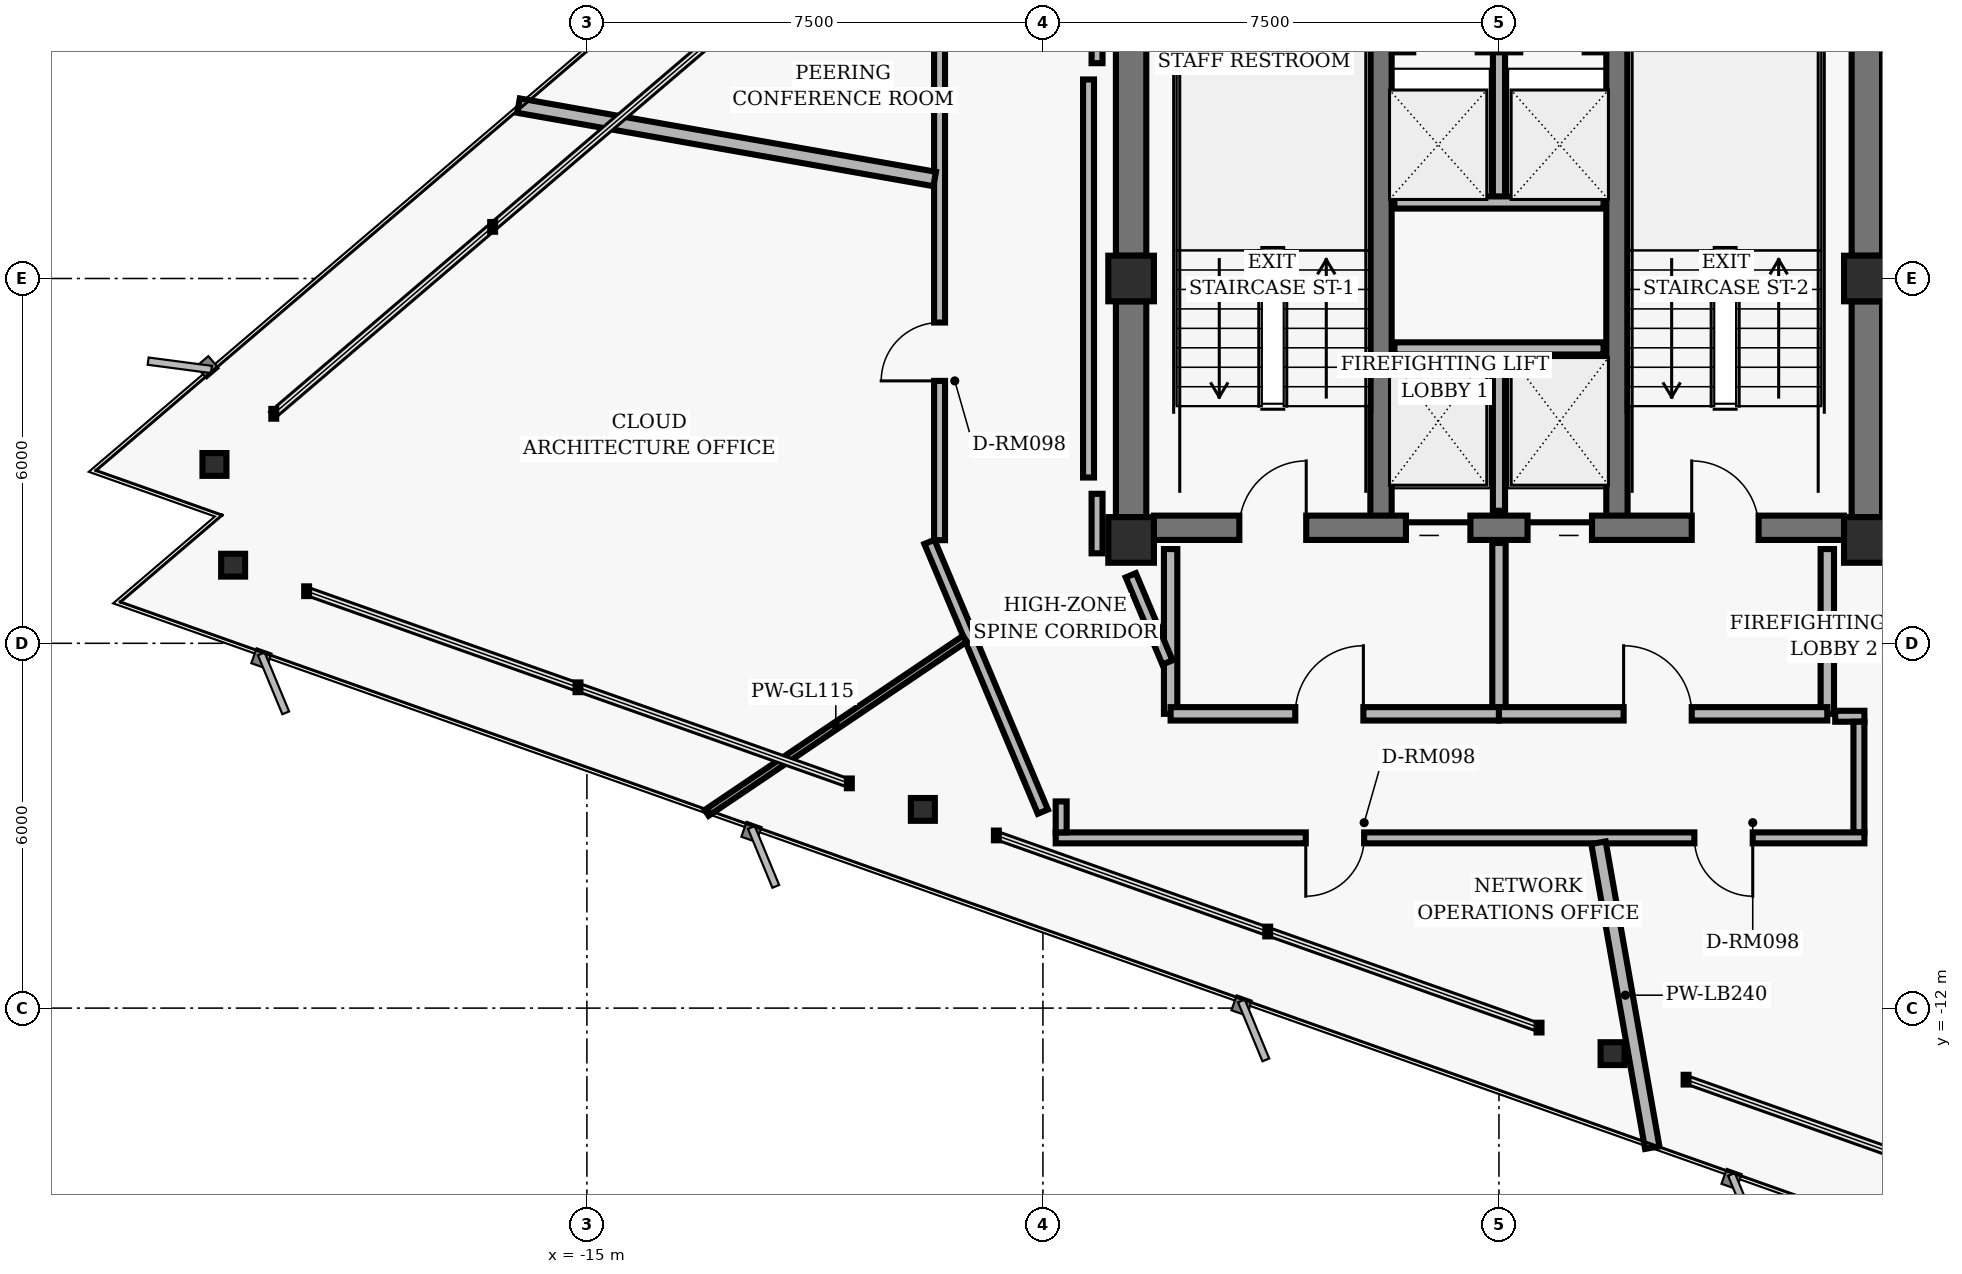
"""IFC4 building model, lengths in metres.
Left out: names, types, materials, properties, quantities, classifications, styles, units other than length and angle.
Written with IfcOpenShell. Run it as: python <this file> out.ifc"""

import sys

from ifc_helpers import new_model, si_unit, direction, frame, frame_2d, origin, origin_2d, place, context, subcontext, project, spatial, rectangle, hollow_rectangle, i_section, extrude, element, fill, save


model = new_model("IFC4")
c1 = context("Model", 3, precision=1e-05, world=origin(), true_north=direction((0.0, 1.0)))
c2 = subcontext(c1, "Body", "Model", "MODEL_VIEW")
j1 = project(units=[si_unit("LENGTHUNIT", "METRE"), si_unit("PLANEANGLEUNIT", "RADIAN")], contexts=[c1])
p1 = place(None, origin())
s1 = spatial("IfcSite", under=j1, at=p1, CompositionType="ELEMENT")
p2 = place(p1, origin())
s2 = spatial("IfcBuilding", under=s1, at=p2, CompositionType="ELEMENT")
p3 = place(p2, frame((0.0, 0.0, 187.52)))
s3 = spatial("IfcBuildingStorey", under=s2, at=p3, CompositionType="ELEMENT", Elevation=187.52)
for number, where, z_axis, x_axis in (
    (1, (-6.05, 0.0, 0.0), (0.0, 0.0, 1.0), (1.0, 0.0, 0.0)),
    (2, (6.05, 0.0, 0.0), (0.0, 0.0, 1.0), (1.0, 0.0, 0.0)),
    (3, (-6.05, -4.3, 0.0), (0.0, 0.0, 1.0), (1.0, 0.0, 0.0)),
    (4, (6.05, -4.3, 0.0), (0.0, 0.0, 1.0), (1.0, 0.0, 0.0)),
):
    element("IfcColumn", number, at=place(p3, frame(where, z_axis=z_axis, x_axis=x_axis)), inside=s3, PredefinedType="COLUMN", context=c2, shape_type="SweptSolid", body=[
        extrude(hollow_rectangle(XDim=0.75, YDim=0.75, WallThickness=0.05, InnerFilletRadius=0.02, OuterFilletRadius=0.04, at=origin_2d()), origin(), (0.0, 0.0, 1.0), 3.04),
    ])
p4 = place(p3, frame((-6.05, 0.375, 0.0), z_axis=(0.0, 0.0, 1.0), x_axis=(0.0, 1.0, 0.0)))
e5 = element("IfcWall", 5, at=p4, inside=s3, PredefinedType="SHEAR", context=c2, shape_type="SweptSolid", body=[
    extrude(rectangle(XDim=3.75, YDim=0.5, at=frame_2d((1.875, 0.0))), origin(), (0.0, 0.0, 1.0), 2.798),
])
p5 = place(p3, frame((-6.05, -3.925, 0.0), z_axis=(0.0, 0.0, 1.0), x_axis=(0.0, 1.0, 0.0)))
e6 = element("IfcWall", 6, at=p5, inside=s3, PredefinedType="SHEAR", context=c2, shape_type="SweptSolid", body=[
    extrude(rectangle(XDim=3.55, YDim=0.5, at=frame_2d((1.775, 0.0))), origin(), (0.0, 0.0, 1.0), 2.798),
])
p6 = place(p3, frame((6.05, 0.375, 0.0), z_axis=(0.0, 0.0, 1.0), x_axis=(0.0, 1.0, 0.0)))
e7 = element("IfcWall", 7, at=p6, inside=s3, PredefinedType="SHEAR", context=c2, shape_type="SweptSolid", body=[
    extrude(rectangle(XDim=3.75, YDim=0.5, at=frame_2d((1.875, 0.0))), origin(), (0.0, 0.0, 1.0), 2.798),
])
p7 = place(p3, frame((6.05, -3.925, 0.0), z_axis=(0.0, 0.0, 1.0), x_axis=(0.0, 1.0, 0.0)))
e8 = element("IfcWall", 8, at=p7, inside=s3, PredefinedType="SHEAR", context=c2, shape_type="SweptSolid", body=[
    extrude(rectangle(XDim=3.55, YDim=0.5, at=frame_2d((1.775, 0.0))), origin(), (0.0, 0.0, 1.0), 2.798),
])
for number, where, z_axis, x_axis in (
    (9, (-1.94, -4.1, 0.0), (0.0, 0.0, 1.0), (0.0, 1.0, 0.0)),
    (10, (1.94, -4.1, 0.0), (0.0, 0.0, 1.0), (0.0, 1.0, 0.0)),
):
    element("IfcWall", number, at=place(p3, frame(where, z_axis=z_axis, x_axis=x_axis)), inside=s3, PredefinedType="SHEAR", context=c2, shape_type="SweptSolid", body=[
        extrude(rectangle(XDim=8.2, YDim=0.35, at=frame_2d((4.1, 0.0))), origin(), (0.0, 0.0, 1.0), 2.798),
    ])
p8 = place(p3, frame((-5.675, -4.1, 0.0), z_axis=(0.0, 0.0, 1.0), x_axis=(1.0, 0.0, 0.0)))
e11 = element("IfcWall", 11, at=p8, inside=s3, PredefinedType="SHEAR", context=c2, shape_type="SweptSolid", body=[
    extrude(rectangle(XDim=11.35, YDim=0.4, at=frame_2d((5.675, 0.0))), origin(), (0.0, 0.0, 1.0), 2.798),
])
p9 = place(p8, frame((1.405, 0.0, 0.0)))
e12 = element("IfcOpeningElement", 12, at=p9, cuts=e11, PredefinedType="OPENING", context=c2, shape_type="SweptSolid", body=[
    extrude(rectangle(XDim=1.1, YDim=2.04, at=frame_2d((0.55, 1.02))), frame((0.0, 0.21, 0.0), z_axis=(0.0, -1.0, 0.0), x_axis=(1.0, 0.0, 0.0)), (0.0, 0.0, 1.0), 0.42),
])
p10 = place(p8, frame((8.845, 0.0, 0.0)))
e13 = element("IfcOpeningElement", 13, at=p10, cuts=e11, PredefinedType="OPENING", context=c2, shape_type="SweptSolid", body=[
    extrude(rectangle(XDim=1.1, YDim=2.04, at=frame_2d((0.55, 1.02))), frame((0.0, 0.21, 0.0), z_axis=(0.0, -1.0, 0.0), x_axis=(1.0, 0.0, 0.0)), (0.0, 0.0, 1.0), 0.42),
])
p11 = place(p8, frame((4.145, 0.0, 0.0)))
e14 = element("IfcOpeningElement", 14, at=p11, cuts=e11, PredefinedType="OPENING", context=c2, shape_type="SweptSolid", body=[
    extrude(rectangle(XDim=1.06, YDim=2.04, at=frame_2d((0.53, 1.02))), frame((0.0, 0.21, 0.0), z_axis=(0.0, -1.0, 0.0), x_axis=(1.0, 0.0, 0.0)), (0.0, 0.0, 1.0), 0.42),
])
p12 = place(p8, frame((6.145, 0.0, 0.0)))
e15 = element("IfcOpeningElement", 15, at=p12, cuts=e11, PredefinedType="OPENING", context=c2, shape_type="SweptSolid", body=[
    extrude(rectangle(XDim=1.06, YDim=2.04, at=frame_2d((0.53, 1.02))), frame((0.0, 0.21, 0.0), z_axis=(0.0, -1.0, 0.0), x_axis=(1.0, 0.0, 0.0)), (0.0, 0.0, 1.0), 0.42),
])
for number, where, z_axis, x_axis in (
    (16, (-21.125, -3.059, 0.0), (0.0, 0.0, 1.0), (1.0, 0.0, 0.0)),
    (17, (-20.818, -4.715, 0.0), (0.0, 0.0, 1.0), (1.0, 0.0, 0.0)),
    (18, (-9.475, -8.732, 0.0), (0.0, 0.0, 1.0), (1.0, 0.0, 0.0)),
    (19, (1.868, -12.749, 0.0), (0.0, 0.0, 1.0), (1.0, 0.0, 0.0)),
):
    element("IfcColumn", number, at=place(p3, frame(where, z_axis=z_axis, x_axis=x_axis)), inside=s3, PredefinedType="COLUMN", context=c2, shape_type="SweptSolid", body=[
        extrude(i_section(OverallWidth=0.394, OverallDepth=0.375, WebThickness=0.017, FlangeThickness=0.028, FilletRadius=0.016, at=origin_2d()), origin(), (0.0, 0.0, 1.0), 3.04),
    ])
p13 = place(p3, frame((0.0, -3.82, 0.0), z_axis=(0.0, 0.0, 1.0), x_axis=(0.0, 1.0, 0.0)))
e20 = element("IfcWall", 20, at=p13, inside=s3, PredefinedType="PARTITIONING", context=c2, shape_type="SweptSolid", body=[
    extrude(rectangle(XDim=2.67, YDim=0.2, at=frame_2d((1.335, 0.0))), origin(), (0.0, 0.0, 1.0), 2.773),
])
p14 = place(p3, frame((-1.72, -1.15, 0.0), z_axis=(0.0, 0.0, 1.0), x_axis=(1.0, 0.0, 0.0)))
e21 = element("IfcWall", 21, at=p14, inside=s3, PredefinedType="PARTITIONING", context=c2, shape_type="SweptSolid", body=[
    extrude(rectangle(XDim=3.44, YDim=0.2, at=frame_2d((1.72, 0.0))), origin(), (0.0, 0.0, 1.0), 2.773),
])
for number, where, z_axis, x_axis in (
    (22, (-5.4, -7.16, 0.0), (0.0, 0.0, 1.0), (0.0, 1.0, 0.0)),
    (23, (5.4, -7.16, 0.0), (0.0, 0.0, 1.0), (0.0, 1.0, 0.0)),
):
    element("IfcWall", number, at=place(p3, frame(where, z_axis=z_axis, x_axis=x_axis)), inside=s3, PredefinedType="PARTITIONING", context=c2, shape_type="SweptSolid", body=[
        extrude(rectangle(XDim=2.71, YDim=0.22, at=frame_2d((1.355, 0.0))), origin(), (0.0, 0.0, 1.0), 2.773),
    ])
p15 = place(p3, frame((0.0, -7.16, 0.0), z_axis=(0.0, 0.0, 1.0), x_axis=(0.0, 1.0, 0.0)))
e24 = element("IfcWall", 24, at=p15, inside=s3, PredefinedType="PARTITIONING", context=c2, shape_type="SweptSolid", body=[
    extrude(rectangle(XDim=2.81, YDim=0.22, at=frame_2d((1.405, 0.0))), origin(), (0.0, 0.0, 1.0), 2.773),
])
p16 = place(p3, frame((-5.4, -7.16, 0.0), z_axis=(0.0, 0.0, 1.0), x_axis=(1.0, 0.0, 0.0)))
e25 = element("IfcWall", 25, at=p16, inside=s3, PredefinedType="PARTITIONING", context=c2, shape_type="SweptSolid", body=[
    extrude(rectangle(XDim=5.4, YDim=0.22, at=frame_2d((2.7, 0.0))), origin(), (0.0, 0.0, 1.0), 2.395),
])
p17 = place(p16, frame((2.05, 0.0, 0.0)))
e26 = element("IfcOpeningElement", 26, at=p17, cuts=e25, PredefinedType="OPENING", context=c2, shape_type="SweptSolid", body=[
    extrude(rectangle(XDim=1.12, YDim=2.02, at=frame_2d((0.56, 1.01))), frame((0.0, 0.12, 0.0), z_axis=(0.0, -1.0, 0.0), x_axis=(1.0, 0.0, 0.0)), (0.0, 0.0, 1.0), 0.24),
])
p18 = place(p3, frame((0.0, -7.16, 0.0), z_axis=(0.0, 0.0, 1.0), x_axis=(1.0, 0.0, 0.0)))
e27 = element("IfcWall", 27, at=p18, inside=s3, PredefinedType="PARTITIONING", context=c2, shape_type="SweptSolid", body=[
    extrude(rectangle(XDim=5.4, YDim=0.22, at=frame_2d((2.7, 0.0))), origin(), (0.0, 0.0, 1.0), 2.395),
])
p19 = place(p18, frame((2.05, 0.0, 0.0)))
e28 = element("IfcOpeningElement", 28, at=p19, cuts=e27, PredefinedType="OPENING", context=c2, shape_type="SweptSolid", body=[
    extrude(rectangle(XDim=1.12, YDim=2.02, at=frame_2d((0.56, 1.01))), frame((0.0, 0.12, 0.0), z_axis=(0.0, -1.0, 0.0), x_axis=(1.0, 0.0, 0.0)), (0.0, 0.0, 1.0), 0.24),
])
p20 = place(p3, frame((0.0, 1.25, 0.0), z_axis=(0.0, 0.0, 1.0), x_axis=(0.0, 1.0, 0.0)))
e29 = element("IfcWall", 29, at=p20, inside=s3, PredefinedType="PARTITIONING", context=c2, shape_type="SweptSolid", body=[
    extrude(rectangle(XDim=2.77, YDim=0.2, at=frame_2d((1.385, 0.0))), origin(), (0.0, 0.0, 1.0), 2.773),
])
p21 = place(p3, frame((-1.72, 1.25, 0.0), z_axis=(0.0, 0.0, 1.0), x_axis=(1.0, 0.0, 0.0)))
e30 = element("IfcWall", 30, at=p21, inside=s3, PredefinedType="PARTITIONING", context=c2, shape_type="SweptSolid", body=[
    extrude(rectangle(XDim=3.44, YDim=0.2, at=frame_2d((1.72, 0.0))), origin(), (0.0, 0.0, 1.0), 2.773),
])
p22 = place(p3, frame((-1.76, 3.82, 0.0), z_axis=(0.0, 0.0, 1.0), x_axis=(1.0, 0.0, 0.0)))
e31 = element("IfcWall", 31, at=p22, inside=s3, PredefinedType="PARTITIONING", context=c2, shape_type="SweptSolid", body=[
    extrude(rectangle(XDim=3.52, YDim=0.2, at=frame_2d((1.76, 0.0))), origin(), (0.0, 0.0, 1.0), 2.773),
])
p23 = place(p22, frame((0.35, 0.0, 0.0)))
e32 = element("IfcOpeningElement", 32, at=p23, cuts=e31, PredefinedType="OPENING", context=c2, shape_type="SweptSolid", body=[
    extrude(rectangle(XDim=1.06, YDim=2.04, at=frame_2d((0.53, 1.02))), frame((0.0, 0.11, 0.0), z_axis=(0.0, -1.0, 0.0), x_axis=(1.0, 0.0, 0.0)), (0.0, 0.0, 1.0), 0.22),
])
p24 = place(p22, frame((2.11, 0.0, 0.0)))
e33 = element("IfcOpeningElement", 33, at=p24, cuts=e31, PredefinedType="OPENING", context=c2, shape_type="SweptSolid", body=[
    extrude(rectangle(XDim=1.06, YDim=2.04, at=frame_2d((0.53, 1.02))), frame((0.0, 0.11, 0.0), z_axis=(0.0, -1.0, 0.0), x_axis=(1.0, 0.0, 0.0)), (0.0, 0.0, 1.0), 0.22),
])
p25 = place(p3, frame((-7.501, -8.769, 0.0), z_axis=(0.0, 0.0, 1.0), x_axis=(-0.387573945081, 0.921838617706, 0.0)))
e34 = element("IfcWall", 34, at=p25, inside=s3, PredefinedType="PARTITIONING", context=c2, shape_type="SweptSolid", body=[
    extrude(rectangle(XDim=4.813, YDim=0.18, at=frame_2d((2.407, 0.0))), origin(), (0.0, 0.0, 1.0), 2.773),
])
p26 = place(p3, frame((-9.2, -4.303, 0.0), z_axis=(0.0, 0.0, 1.0), x_axis=(0.0, 1.0, 0.0)))
e35 = element("IfcWall", 35, at=p26, inside=s3, PredefinedType="PARTITIONING", context=c2, shape_type="SweptSolid", body=[
    extrude(rectangle(XDim=8.607, YDim=0.18, at=frame_2d((4.303, 0.0))), origin(), (0.0, 0.0, 1.0), 2.773),
])
p27 = place(p26, frame((2.619, 0.0, 0.0)))
e36 = element("IfcOpeningElement", 36, at=p27, cuts=e35, PredefinedType="OPENING", context=c2, shape_type="SweptSolid", body=[
    extrude(rectangle(XDim=0.96, YDim=2.02, at=frame_2d((0.48, 1.01))), frame((0.0, 0.1, 0.0), z_axis=(0.0, -1.0, 0.0), x_axis=(1.0, 0.0, 0.0)), (0.0, 0.0, 1.0), 0.2),
])
p28 = place(p3, frame((-6.61, 4.94, 0.0), z_axis=(0.0, 0.0, 1.0), x_axis=(0.0, -1.0, 0.0)))
e37 = element("IfcWall", 37, at=p28, inside=s3, PredefinedType="PARTITIONING", context=c2, shape_type="SweptSolid", body=[
    extrude(rectangle(XDim=1.399, YDim=0.18, at=frame_2d((0.699, 0.0))), origin(), (0.0, 0.0, 1.0), 2.773),
])
p29 = place(p3, frame((-6.75, 3.273, 0.0), z_axis=(0.0, 0.0, 1.0), x_axis=(0.0, -1.0, 0.0)))
e38 = element("IfcWall", 38, at=p29, inside=s3, PredefinedType="PARTITIONING", context=c2, shape_type="SweptSolid", body=[
    extrude(rectangle(XDim=6.547, YDim=0.18, at=frame_2d((3.273, 0.0))), origin(), (0.0, 0.0, 1.0), 2.773),
])
p30 = place(p3, frame((-6.61, -3.541, 0.0), z_axis=(0.0, 0.0, 1.0), x_axis=(0.0, -1.0, 0.0)))
e39 = element("IfcWall", 39, at=p30, inside=s3, PredefinedType="PARTITIONING", context=c2, shape_type="SweptSolid", body=[
    extrude(rectangle(XDim=0.979, YDim=0.18, at=frame_2d((0.489, 0.0))), origin(), (0.0, 0.0, 1.0), 2.773),
])
p31 = place(p3, frame((-6.055, -4.882, 0.0), z_axis=(0.0, 0.0, 1.0), x_axis=(0.387579540458, -0.921836265189, 0.0)))
e40 = element("IfcWall", 40, at=p31, inside=s3, PredefinedType="PARTITIONING", context=c2, shape_type="SweptSolid", body=[
    extrude(rectangle(XDim=1.555, YDim=0.18, at=frame_2d((0.777, 0.0))), origin(), (0.0, 0.0, 1.0), 2.773),
])
p32 = place(p3, frame((5.53, -7.2, 0.0), z_axis=(0.0, 0.0, 1.0), x_axis=(1.0, 0.0, 0.0)))
e41 = element("IfcWall", 41, at=p32, inside=s3, PredefinedType="PARTITIONING", context=c2, shape_type="SweptSolid", body=[
    extrude(rectangle(XDim=0.48, YDim=0.18, at=frame_2d((0.24, 0.0))), origin(), (0.0, 0.0, 1.0), 2.773),
])
p33 = place(p3, frame((5.92, -7.29, 0.0), z_axis=(0.0, 0.0, 1.0), x_axis=(0.0, -1.0, 0.0)))
e42 = element("IfcWall", 42, at=p33, inside=s3, PredefinedType="PARTITIONING", context=c2, shape_type="SweptSolid", body=[
    extrude(rectangle(XDim=1.82, YDim=0.18, at=frame_2d((0.91, 0.0))), origin(), (0.0, 0.0, 1.0), 2.773),
])
p34 = place(p3, frame((6.01, -9.2, 0.0), z_axis=(0.0, 0.0, 1.0), x_axis=(-1.0, 0.0, 0.0)))
e43 = element("IfcWall", 43, at=p34, inside=s3, PredefinedType="PARTITIONING", context=c2, shape_type="SweptSolid", body=[
    extrude(rectangle(XDim=13.3, YDim=0.18, at=frame_2d((6.65, 0.0))), origin(), (0.0, 0.0, 1.0), 2.395),
])
p35 = place(p34, frame((8.227, 0.0, 0.0)))
e44 = element("IfcOpeningElement", 44, at=p35, cuts=e43, PredefinedType="OPENING", context=c2, shape_type="SweptSolid", body=[
    extrude(rectangle(XDim=0.96, YDim=2.02, at=frame_2d((0.48, 1.01))), frame((0.0, 0.1, 0.0), z_axis=(0.0, -1.0, 0.0), x_axis=(1.0, 0.0, 0.0)), (0.0, 0.0, 1.0), 0.2),
])
p36 = place(p34, frame((1.836, 0.0, 0.0)))
e45 = element("IfcOpeningElement", 45, at=p36, cuts=e43, PredefinedType="OPENING", context=c2, shape_type="SweptSolid", body=[
    extrude(rectangle(XDim=0.96, YDim=2.02, at=frame_2d((0.48, 1.01))), frame((0.0, 0.1, 0.0), z_axis=(0.0, -1.0, 0.0), x_axis=(1.0, 0.0, 0.0)), (0.0, 0.0, 1.0), 0.2),
])
p37 = place(p3, frame((-7.2, -9.11, 0.0), z_axis=(0.0, 0.0, 1.0), x_axis=(0.0, 1.0, 0.0)))
e46 = element("IfcWall", 46, at=p37, inside=s3, PredefinedType="PARTITIONING", context=c2, shape_type="SweptSolid", body=[
    extrude(rectangle(XDim=0.51, YDim=0.18, at=frame_2d((0.255, 0.0))), origin(), (0.0, 0.0, 1.0), 2.773),
])
p38 = place(p3, frame((-8.784, -5.925, 0.0), z_axis=(0.0, 0.0, 1.0), x_axis=(-0.829060822753, -0.559158432089, 0.0)))
e47 = element("IfcWall", 47, at=p38, inside=s3, PredefinedType="MOVABLE", context=c2, shape_type="SweptSolid", body=[
    extrude(rectangle(XDim=5.122, YDim=0.115, at=frame_2d((2.561, 0.0))), origin(), (0.0, 0.0, 1.0), 2.773),
])
p39 = place(p3, frame((1.636, -9.28, 0.0), z_axis=(0.0, 0.0, 1.0), x_axis=(0.173634919368, -0.984810090716, 0.0)))
e48 = element("IfcWall", 48, at=p39, inside=s3, PredefinedType="PARTITIONING", context=c2, shape_type="SweptSolid", body=[
    extrude(rectangle(XDim=5.093, YDim=0.24, at=frame_2d((2.546, 0.0))), origin(), (0.0, 0.0, 1.0), 2.773),
])
p40 = place(p3, frame((-9.28, 1.636, 0.0), z_axis=(0.0, 0.0, 1.0), x_axis=(-0.984803709336, 0.173671108934, 0.0)))
e49 = element("IfcWall", 49, at=p40, inside=s3, PredefinedType="PARTITIONING", context=c2, shape_type="SweptSolid", body=[
    extrude(rectangle(XDim=6.95, YDim=0.24, at=frame_2d((3.475, 0.0))), origin(), (0.0, 0.0, 1.0), 2.773),
])
p41 = place(p9, origin())
e50 = element("IfcDoor", 50, at=p41, inside=s3, OperationType="SINGLE_SWING_RIGHT", PredefinedType="DOOR", context=c2, shape_type="SweptSolid", body=[
    extrude(rectangle(XDim=1.1, YDim=2.04, at=frame_2d((0.55, 1.02))), frame((0.0, 0.025, 0.0), z_axis=(0.0, -1.0, 0.0), x_axis=(1.0, 0.0, 0.0)), (0.0, 0.0, 1.0), 0.05),
])
fill(e12, e50)
p42 = place(p10, origin())
e51 = element("IfcDoor", 51, at=p42, inside=s3, OperationType="SINGLE_SWING_LEFT", PredefinedType="DOOR", context=c2, shape_type="SweptSolid", body=[
    extrude(rectangle(XDim=1.1, YDim=2.04, at=frame_2d((0.55, 1.02))), frame((0.0, 0.025, 0.0), z_axis=(0.0, -1.0, 0.0), x_axis=(1.0, 0.0, 0.0)), (0.0, 0.0, 1.0), 0.05),
])
fill(e13, e51)
p43 = place(p11, origin())
e52 = element("IfcDoor", 52, at=p43, inside=s3, OperationType="SLIDING_TO_LEFT", PredefinedType="DOOR", context=c2, shape_type="SweptSolid", body=[
    extrude(rectangle(XDim=1.06, YDim=2.04, at=frame_2d((0.53, 1.02))), frame((0.0, 0.025, 0.0), z_axis=(0.0, -1.0, 0.0), x_axis=(1.0, 0.0, 0.0)), (0.0, 0.0, 1.0), 0.05),
])
fill(e14, e52)
p44 = place(p12, origin())
e53 = element("IfcDoor", 53, at=p44, inside=s3, OperationType="SLIDING_TO_RIGHT", PredefinedType="DOOR", context=c2, shape_type="SweptSolid", body=[
    extrude(rectangle(XDim=1.06, YDim=2.04, at=frame_2d((0.53, 1.02))), frame((0.0, 0.025, 0.0), z_axis=(0.0, -1.0, 0.0), x_axis=(1.0, 0.0, 0.0)), (0.0, 0.0, 1.0), 0.05),
])
fill(e15, e53)
p45 = place(p17, origin())
e54 = element("IfcDoor", 54, at=p45, inside=s3, OperationType="SINGLE_SWING_RIGHT", PredefinedType="DOOR", context=c2, shape_type="SweptSolid", body=[
    extrude(rectangle(XDim=1.12, YDim=2.02, at=frame_2d((0.56, 1.01))), frame((0.0, 0.025, 0.0), z_axis=(0.0, -1.0, 0.0), x_axis=(1.0, 0.0, 0.0)), (0.0, 0.0, 1.0), 0.05),
])
fill(e26, e54)
p46 = place(p19, origin())
e55 = element("IfcDoor", 55, at=p46, inside=s3, OperationType="SINGLE_SWING_LEFT", PredefinedType="DOOR", context=c2, shape_type="SweptSolid", body=[
    extrude(rectangle(XDim=1.12, YDim=2.02, at=frame_2d((0.56, 1.01))), frame((0.0, 0.025, 0.0), z_axis=(0.0, -1.0, 0.0), x_axis=(1.0, 0.0, 0.0)), (0.0, 0.0, 1.0), 0.05),
])
fill(e28, e55)
p47 = place(p27, origin())
e56 = element("IfcDoor", 56, at=p47, inside=s3, OperationType="SINGLE_SWING_LEFT", PredefinedType="DOOR", context=c2, shape_type="SweptSolid", body=[
    extrude(rectangle(XDim=0.96, YDim=2.02, at=frame_2d((0.48, 1.01))), frame((0.0, 0.025, 0.0), z_axis=(0.0, -1.0, 0.0), x_axis=(1.0, 0.0, 0.0)), (0.0, 0.0, 1.0), 0.05),
])
fill(e36, e56)
p48 = place(p35, origin())
e57 = element("IfcDoor", 57, at=p48, inside=s3, OperationType="SINGLE_SWING_RIGHT", PredefinedType="DOOR", context=c2, shape_type="SweptSolid", body=[
    extrude(rectangle(XDim=0.96, YDim=2.02, at=frame_2d((0.48, 1.01))), frame((0.0, 0.025, 0.0), z_axis=(0.0, -1.0, 0.0), x_axis=(1.0, 0.0, 0.0)), (0.0, 0.0, 1.0), 0.05),
])
fill(e44, e57)
p49 = place(p36, origin())
e58 = element("IfcDoor", 58, at=p49, inside=s3, OperationType="SINGLE_SWING_LEFT", PredefinedType="DOOR", context=c2, shape_type="SweptSolid", body=[
    extrude(rectangle(XDim=0.96, YDim=2.02, at=frame_2d((0.48, 1.01))), frame((0.0, 0.025, 0.0), z_axis=(0.0, -1.0, 0.0), x_axis=(1.0, 0.0, 0.0)), (0.0, 0.0, 1.0), 0.05),
])
fill(e45, e58)
save(model, sys.argv[1])
